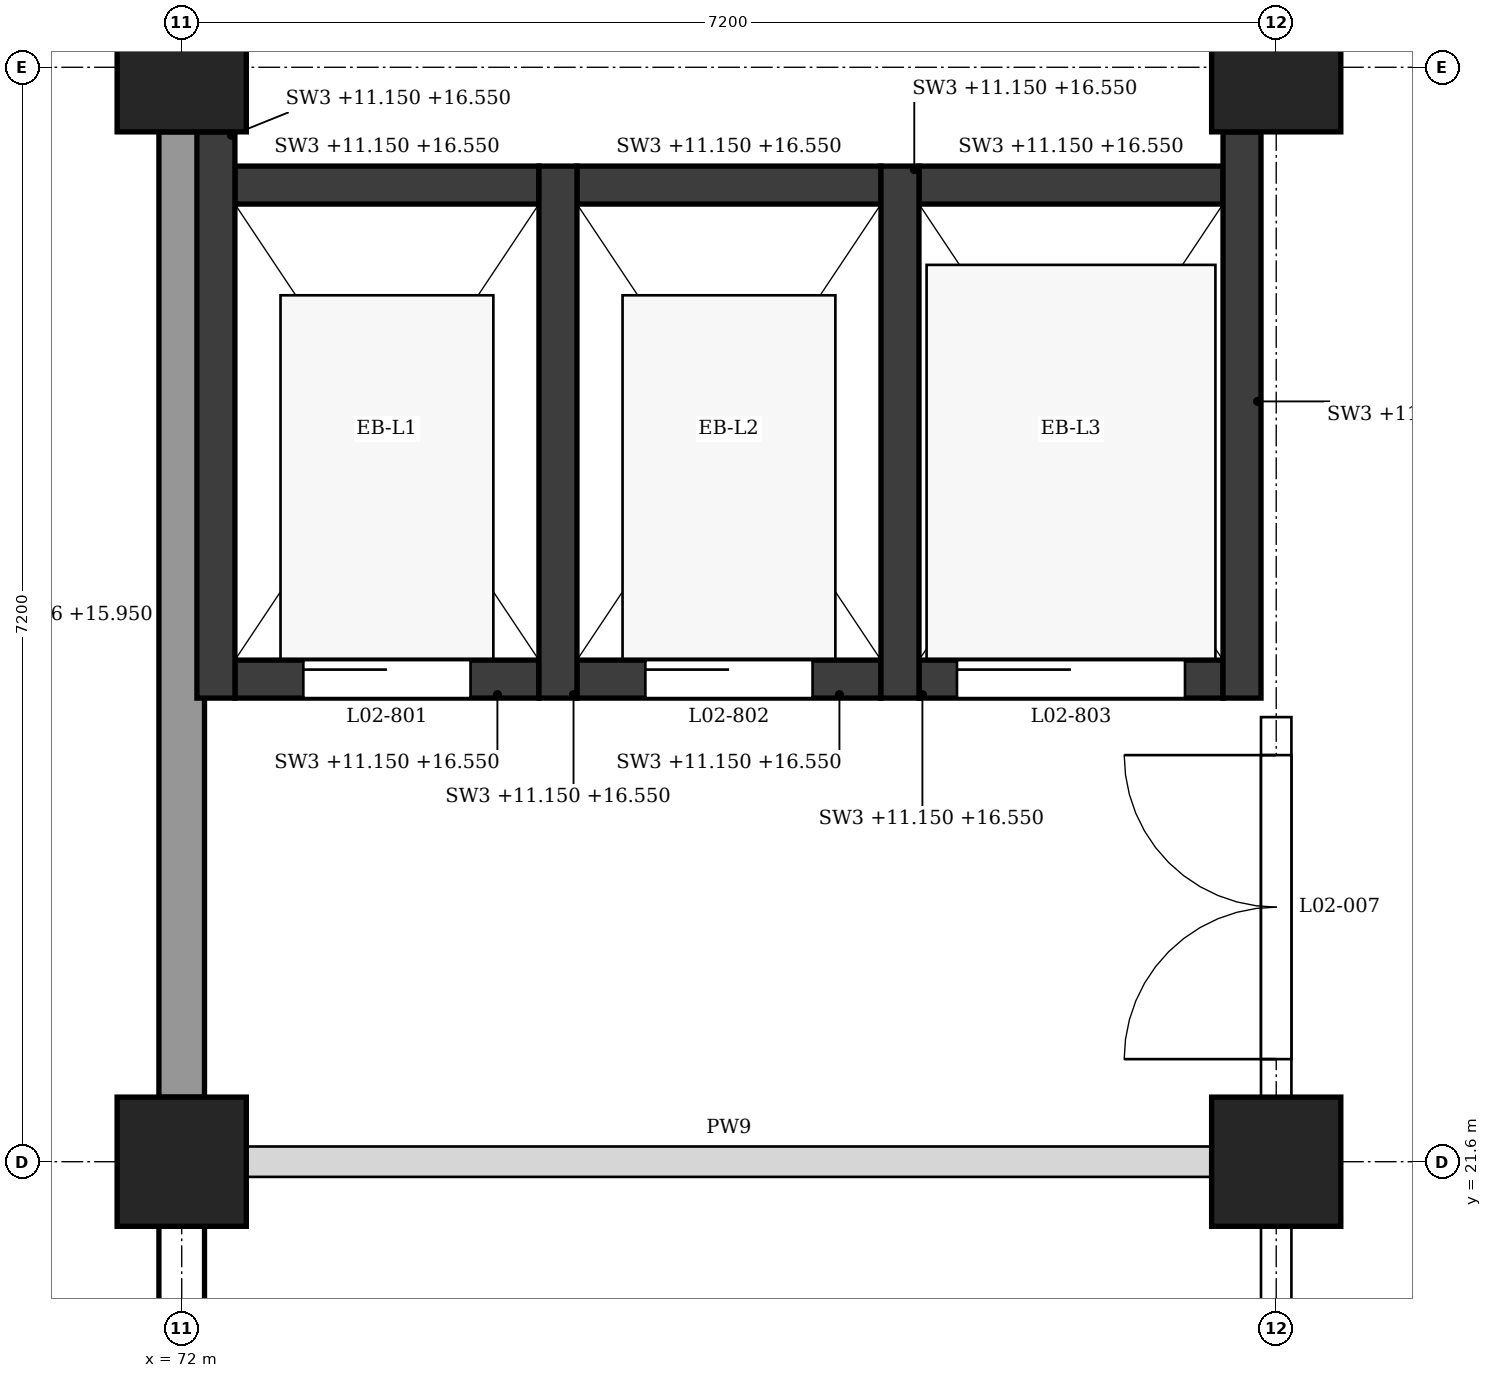
"""IFC4 building model, lengths in metres.
Left out: names, types, materials, properties, quantities, classifications, styles, units other than length and angle.
Written with IfcOpenShell. Run it as: python <this file> out.ifc"""

import sys

from ifc_helpers import new_model, si_unit, direction, frame, frame_2d, origin, origin_2d, place, context, subcontext, project, spatial, rectangle, extrude, element, fill, save


model = new_model("IFC4")
c1 = context("Model", 3, precision=1e-05, world=origin(), true_north=direction((0.0, 1.0)))
c2 = subcontext(c1, "Body", "Model", "MODEL_VIEW")
j1 = project(units=[si_unit("LENGTHUNIT", "METRE"), si_unit("PLANEANGLEUNIT", "RADIAN")], contexts=[c1])
p1 = place(None, origin())
s1 = spatial("IfcSite", under=j1, at=p1, CompositionType="ELEMENT")
p2 = place(p1, origin())
s2 = spatial("IfcBuilding", under=s1, at=p2, CompositionType="ELEMENT")
p3 = place(p2, frame((0.0, 0.0, 11.4)))
s3 = spatial("IfcBuildingStorey", under=s2, at=p3, CompositionType="ELEMENT", Elevation=11.4)
for number, where, z_axis, x_axis in (
    (1, (72.0, 21.6, 0.0), (0.0, 0.0, 1.0), (1.0, 0.0, 0.0)),
    (2, (72.0, 28.8, 0.0), (0.0, 0.0, 1.0), (1.0, 0.0, 0.0)),
    (3, (79.2, 21.6, 0.0), (0.0, 0.0, 1.0), (1.0, 0.0, 0.0)),
    (4, (79.2, 28.8, 0.0), (0.0, 0.0, 1.0), (1.0, 0.0, 0.0)),
):
    element("IfcColumn", number, at=place(p3, frame(where, z_axis=z_axis, x_axis=x_axis)), inside=s3, PredefinedType="COLUMN", context=c2, shape_type="SweptSolid", body=[
        extrude(rectangle(XDim=0.85, YDim=0.85, at=origin_2d()), origin(), (0.0, 0.0, 1.0), 5.4),
    ])
for number, where, z_axis, x_axis in (
    (5, (72.0, 14.825, 0.0), (0.0, 0.0, 1.0), (0.0, 1.0, 0.0)),
    (6, (72.0, 22.025, 0.0), (0.0, 0.0, 1.0), (0.0, 1.0, 0.0)),
):
    element("IfcWall", number, at=place(p3, frame(where, z_axis=z_axis, x_axis=x_axis)), inside=s3, PredefinedType="STANDARD", context=c2, shape_type="SweptSolid", body=[
        extrude(rectangle(XDim=6.35, YDim=0.3, at=frame_2d((3.175, 0.0))), origin(), (0.0, 0.0, 1.0), 4.55),
    ])
p4 = place(p3, frame((72.225, 24.65, -0.25), z_axis=(0.0, 0.0, 1.0), x_axis=(0.0, 1.0, 0.0)))
e7 = element("IfcWall", 7, at=p4, inside=s3, PredefinedType="SHEAR", context=c2, shape_type="SweptSolid", body=[
    extrude(rectangle(XDim=3.725, YDim=0.25, at=frame_2d((1.863, 0.0))), origin(), (0.0, 0.0, 1.0), 5.4),
])
for number, where, z_axis, x_axis in (
    (8, (74.475, 24.65, -0.25), (0.0, 0.0, 1.0), (0.0, 1.0, 0.0)),
    (9, (76.725, 24.65, -0.25), (0.0, 0.0, 1.0), (0.0, 1.0, 0.0)),
):
    element("IfcWall", number, at=place(p3, frame(where, z_axis=z_axis, x_axis=x_axis)), inside=s3, PredefinedType="SHEAR", context=c2, shape_type="SweptSolid", body=[
        extrude(rectangle(XDim=3.5, YDim=0.25, at=frame_2d((1.75, 0.0))), origin(), (0.0, 0.0, 1.0), 5.4),
    ])
p5 = place(p3, frame((78.975, 24.65, -0.25), z_axis=(0.0, 0.0, 1.0), x_axis=(0.0, 1.0, 0.0)))
e10 = element("IfcWall", 10, at=p5, inside=s3, PredefinedType="SHEAR", context=c2, shape_type="SweptSolid", body=[
    extrude(rectangle(XDim=3.725, YDim=0.25, at=frame_2d((1.863, 0.0))), origin(), (0.0, 0.0, 1.0), 5.4),
])
p6 = place(p3, frame((72.35, 24.775, -0.25), z_axis=(0.0, 0.0, 1.0), x_axis=(1.0, 0.0, 0.0)))
e11 = element("IfcWall", 11, at=p6, inside=s3, PredefinedType="SHEAR", context=c2, shape_type="SweptSolid", body=[
    extrude(rectangle(XDim=2.0, YDim=0.25, at=frame_2d((1.0, 0.0))), origin(), (0.0, 0.0, 1.0), 5.4),
])
p7 = place(p6, frame((0.45, 0.0, 0.25)))
e12 = element("IfcOpeningElement", 12, at=p7, cuts=e11, PredefinedType="OPENING", context=c2, shape_type="SweptSolid", body=[
    extrude(rectangle(XDim=1.1, YDim=2.1, at=frame_2d((0.55, 1.05))), frame((0.0, 0.135, 0.0), z_axis=(0.0, -1.0, 0.0), x_axis=(1.0, 0.0, 0.0)), (0.0, 0.0, 1.0), 0.27),
])
p8 = place(p3, frame((72.35, 28.025, -0.25), z_axis=(0.0, 0.0, 1.0), x_axis=(1.0, 0.0, 0.0)))
e13 = element("IfcWall", 13, at=p8, inside=s3, PredefinedType="SHEAR", context=c2, shape_type="SweptSolid", body=[
    extrude(rectangle(XDim=2.0, YDim=0.25, at=frame_2d((1.0, 0.0))), origin(), (0.0, 0.0, 1.0), 5.4),
])
p9 = place(p3, frame((74.6, 24.775, -0.25), z_axis=(0.0, 0.0, 1.0), x_axis=(1.0, 0.0, 0.0)))
e14 = element("IfcWall", 14, at=p9, inside=s3, PredefinedType="SHEAR", context=c2, shape_type="SweptSolid", body=[
    extrude(rectangle(XDim=2.0, YDim=0.25, at=frame_2d((1.0, 0.0))), origin(), (0.0, 0.0, 1.0), 5.4),
])
p10 = place(p9, frame((0.45, 0.0, 0.25)))
e15 = element("IfcOpeningElement", 15, at=p10, cuts=e14, PredefinedType="OPENING", context=c2, shape_type="SweptSolid", body=[
    extrude(rectangle(XDim=1.1, YDim=2.1, at=frame_2d((0.55, 1.05))), frame((0.0, 0.135, 0.0), z_axis=(0.0, -1.0, 0.0), x_axis=(1.0, 0.0, 0.0)), (0.0, 0.0, 1.0), 0.27),
])
p11 = place(p3, frame((74.6, 28.025, -0.25), z_axis=(0.0, 0.0, 1.0), x_axis=(1.0, 0.0, 0.0)))
e16 = element("IfcWall", 16, at=p11, inside=s3, PredefinedType="SHEAR", context=c2, shape_type="SweptSolid", body=[
    extrude(rectangle(XDim=2.0, YDim=0.25, at=frame_2d((1.0, 0.0))), origin(), (0.0, 0.0, 1.0), 5.4),
])
p12 = place(p3, frame((76.85, 24.775, -0.25), z_axis=(0.0, 0.0, 1.0), x_axis=(1.0, 0.0, 0.0)))
e17 = element("IfcWall", 17, at=p12, inside=s3, PredefinedType="SHEAR", context=c2, shape_type="SweptSolid", body=[
    extrude(rectangle(XDim=2.0, YDim=0.25, at=frame_2d((1.0, 0.0))), origin(), (0.0, 0.0, 1.0), 5.4),
])
p13 = place(p12, frame((0.25, 0.0, 0.25)))
e18 = element("IfcOpeningElement", 18, at=p13, cuts=e17, PredefinedType="OPENING", context=c2, shape_type="SweptSolid", body=[
    extrude(rectangle(XDim=1.5, YDim=2.1, at=frame_2d((0.75, 1.05))), frame((0.0, 0.135, 0.0), z_axis=(0.0, -1.0, 0.0), x_axis=(1.0, 0.0, 0.0)), (0.0, 0.0, 1.0), 0.27),
])
p14 = place(p3, frame((76.85, 28.025, -0.25), z_axis=(0.0, 0.0, 1.0), x_axis=(1.0, 0.0, 0.0)))
e19 = element("IfcWall", 19, at=p14, inside=s3, PredefinedType="SHEAR", context=c2, shape_type="SweptSolid", body=[
    extrude(rectangle(XDim=2.0, YDim=0.25, at=frame_2d((1.0, 0.0))), origin(), (0.0, 0.0, 1.0), 5.4),
])
p15 = place(p3, frame((72.425, 21.6, 0.0), z_axis=(0.0, 0.0, 1.0), x_axis=(1.0, 0.0, 0.0)))
e20 = element("IfcWall", 20, at=p15, inside=s3, PredefinedType="PARTITIONING", context=c2, shape_type="SweptSolid", body=[
    extrude(rectangle(XDim=6.35, YDim=0.2, at=frame_2d((3.175, 0.0))), origin(), (0.0, 0.0, 1.0), 4.4),
])
p16 = place(p3, frame((79.2, 14.825, 0.0), z_axis=(0.0, 0.0, 1.0), x_axis=(0.0, 1.0, 0.0)))
e21 = element("IfcWall", 21, at=p16, inside=s3, PredefinedType="PARTITIONING", context=c2, shape_type="SweptSolid", body=[
    extrude(rectangle(XDim=6.35, YDim=0.2, at=frame_2d((3.175, 0.0))), origin(), (0.0, 0.0, 1.0), 4.4),
])
p17 = place(p16, frame((2.675, 0.0, 0.0)))
e22 = element("IfcOpeningElement", 22, at=p17, cuts=e21, PredefinedType="OPENING", context=c2, shape_type="SweptSolid", body=[
    extrude(rectangle(XDim=1.0, YDim=2.1, at=frame_2d((0.5, 1.05))), frame((0.0, 0.11, 0.0), z_axis=(0.0, -1.0, 0.0), x_axis=(1.0, 0.0, 0.0)), (0.0, 0.0, 1.0), 0.22),
])
p18 = place(p3, frame((79.2, 22.025, 0.0), z_axis=(0.0, 0.0, 1.0), x_axis=(0.0, 1.0, 0.0)))
e23 = element("IfcWall", 23, at=p18, inside=s3, PredefinedType="PARTITIONING", context=c2, shape_type="SweptSolid", body=[
    extrude(rectangle(XDim=2.5, YDim=0.2, at=frame_2d((1.25, 0.0))), origin(), (0.0, 0.0, 1.0), 4.4),
])
p19 = place(p18, frame((0.25, 0.0, 0.0)))
e24 = element("IfcOpeningElement", 24, at=p19, cuts=e23, PredefinedType="OPENING", context=c2, shape_type="SweptSolid", body=[
    extrude(rectangle(XDim=2.0, YDim=2.4, at=frame_2d((1.0, 1.2))), frame((0.0, 0.11, 0.0), z_axis=(0.0, -1.0, 0.0), x_axis=(1.0, 0.0, 0.0)), (0.0, 0.0, 1.0), 0.22),
])
p20 = place(p7, origin())
e25 = element("IfcDoor", 25, at=p20, inside=s3, OperationType="SLIDING_TO_LEFT", PredefinedType="DOOR", context=c2, shape_type="SweptSolid", body=[
    extrude(rectangle(XDim=1.1, YDim=2.1, at=frame_2d((0.55, 1.05))), frame((0.0, 0.025, 0.0), z_axis=(0.0, -1.0, 0.0), x_axis=(1.0, 0.0, 0.0)), (0.0, 0.0, 1.0), 0.05),
])
fill(e12, e25)
p21 = place(p10, origin())
e26 = element("IfcDoor", 26, at=p21, inside=s3, OperationType="SLIDING_TO_LEFT", PredefinedType="DOOR", context=c2, shape_type="SweptSolid", body=[
    extrude(rectangle(XDim=1.1, YDim=2.1, at=frame_2d((0.55, 1.05))), frame((0.0, 0.025, 0.0), z_axis=(0.0, -1.0, 0.0), x_axis=(1.0, 0.0, 0.0)), (0.0, 0.0, 1.0), 0.05),
])
fill(e15, e26)
p22 = place(p13, origin())
e27 = element("IfcDoor", 27, at=p22, inside=s3, OperationType="SLIDING_TO_LEFT", PredefinedType="DOOR", context=c2, shape_type="SweptSolid", body=[
    extrude(rectangle(XDim=1.5, YDim=2.1, at=frame_2d((0.75, 1.05))), frame((0.0, 0.025, 0.0), z_axis=(0.0, -1.0, 0.0), x_axis=(1.0, 0.0, 0.0)), (0.0, 0.0, 1.0), 0.05),
])
fill(e18, e27)
p23 = place(p19, origin())
e28 = element("IfcDoor", 28, at=p23, inside=s3, OperationType="DOUBLE_DOOR_SINGLE_SWING", PredefinedType="DOOR", context=c2, shape_type="SweptSolid", body=[
    extrude(rectangle(XDim=2.0, YDim=2.4, at=frame_2d((1.0, 1.2))), frame((0.0, 0.025, 0.0), z_axis=(0.0, -1.0, 0.0), x_axis=(1.0, 0.0, 0.0)), (0.0, 0.0, 1.0), 0.05),
])
fill(e24, e28)
save(model, sys.argv[1])
